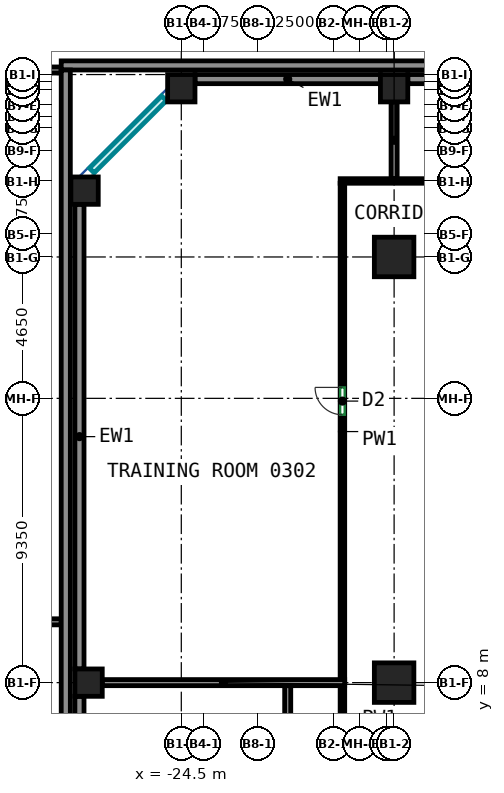
"""IFC4 building model, lengths in metres.
Left out: names, types, materials, properties, quantities, classifications, styles, units other than length and angle.
Written with IfcOpenShell. Run it as: python <this file> out.ifc"""

import sys

from ifc_helpers import new_model, si_unit, direction, frame, frame_2d, origin, origin_2d, place, context, subcontext, project, spatial, rectangle, extrude, source, transform, mapped, element, fill, save


model = new_model("IFC4")
c1 = context("Model", 3, precision=1e-05, world=origin(), true_north=direction((0.0, 1.0)))
c2 = subcontext(c1, "Body", "Model", "MODEL_VIEW")
j1 = project(units=[si_unit("LENGTHUNIT", "METRE"), si_unit("PLANEANGLEUNIT", "RADIAN")], contexts=[c1])
p1 = place(None, origin())
s1 = spatial("IfcSite", under=j1, at=p1, CompositionType="ELEMENT")
p2 = place(p1, origin())
s2 = spatial("IfcBuilding", under=s1, at=p2, CompositionType="ELEMENT")
p3 = place(p2, frame((0.0, 0.0, 18.0)))
s3 = spatial("IfcBuildingStorey", under=s2, at=p3, CompositionType="ELEMENT", Elevation=18.0)
m1 = source(origin(), c2, "Body", "SweptSolid", [
    extrude(rectangle(XDim=0.9, YDim=0.9, at=origin_2d()), origin(), (0.0, 0.0, 1.0), 4.1),
])
for number, where, z_axis, x_axis in (
    (1, (-27.682, 24.182, 0.0), (0.0, 0.0, 1.0), (1.0, 0.0, 0.0)),
    (2, (-27.55, 8.0, 0.0), (0.0, 0.0, 1.0), (1.0, 0.0, 0.0)),
    (3, (-24.5, 27.55, 0.0), (0.0, 0.0, 1.0), (1.0, 0.0, 0.0)),
):
    element("IfcColumn", number, at=place(p3, frame(where, z_axis=z_axis, x_axis=x_axis)), inside=s3, PredefinedType="COLUMN", context=c2, shape_type="MappedRepresentation", body=[
        mapped(m1, transform((0.0, 0.0, 0.0))),
    ])
m2 = source(origin(), c2, "Body", "SweptSolid", [
    extrude(rectangle(XDim=1.3, YDim=1.3, at=origin_2d()), origin(), (0.0, 0.0, 1.0), 4.1),
])
for number, where, z_axis, x_axis in (
    (4, (-17.5, 8.0, 0.0), (0.0, 0.0, 1.0), (1.0, 0.0, 0.0)),
    (5, (-17.5, 22.0, 0.0), (0.0, 0.0, 1.0), (1.0, 0.0, 0.0)),
):
    element("IfcColumn", number, at=place(p3, frame(where, z_axis=z_axis, x_axis=x_axis)), inside=s3, PredefinedType="COLUMN", context=c2, shape_type="MappedRepresentation", body=[
        mapped(m2, transform((0.0, 0.0, 0.0))),
    ])
p4 = place(p3, frame((-17.5, 27.55, 0.0), z_axis=(0.0, 0.0, 1.0), x_axis=(1.0, 0.0, 0.0)))
e6 = element("IfcColumn", 6, at=p4, inside=s3, PredefinedType="COLUMN", context=c2, shape_type="MappedRepresentation", body=[
    mapped(m1, transform((0.0, 0.0, 0.0))),
])
m3 = source(origin(), c2, "Body", "SweptSolid", [
    extrude(rectangle(XDim=6.1, YDim=0.3, at=frame_2d((3.05, 0.0))), origin(), (0.0, 0.0, 1.0), 4.1),
])
for number, where, z_axis, x_axis in (
    (7, (-10.95, 27.85, 0.0), (0.0, 0.0, 1.0), (-1.0, 0.0, 0.0)),
    (8, (-17.95, 27.85, 0.0), (0.0, 0.0, 1.0), (-1.0, 0.0, 0.0)),
):
    element("IfcWall", number, at=place(p3, frame(where, z_axis=z_axis, x_axis=x_axis)), inside=s3, PredefinedType="SOLIDWALL", context=c2, shape_type="MappedRepresentation", body=[
        mapped(m3, transform((0.0, 0.0, 0.0))),
    ])
m4 = source(origin(), c2, "Body", "SweptSolid", [
    extrude(rectangle(XDim=15.282, YDim=0.3, at=frame_2d((7.641, 0.0))), origin(), (0.0, 0.0, 1.0), 4.1),
])
p5 = place(p3, frame((-27.85, 23.732, 0.0), z_axis=(0.0, 0.0, 1.0), x_axis=(0.0, -1.0, 0.0)))
e9 = element("IfcWall", 9, at=p5, inside=s3, PredefinedType="SOLIDWALL", context=c2, shape_type="MappedRepresentation", body=[
    mapped(m4, transform((0.0, 0.0, 0.0))),
])
m5 = source(origin(), c2, "Body", "SweptSolid", [
    extrude(rectangle(XDim=8.1, YDim=0.3, at=frame_2d((4.05, 0.0))), origin(), (0.0, 0.0, 1.0), 4.1),
])
p6 = place(p3, frame((-27.85, 7.55, 0.0), z_axis=(0.0, 0.0, 1.0), x_axis=(0.0, -1.0, 0.0)))
e10 = element("IfcWall", 10, at=p6, inside=s3, PredefinedType="SOLIDWALL", context=c2, shape_type="MappedRepresentation", body=[
    mapped(m5, transform((0.0, 0.0, 0.0))),
])
m6 = source(origin(), c2, "Body", "SweptSolid", [
    extrude(rectangle(XDim=56.3, YDim=0.3, at=frame_2d((28.15, 0.0))), origin(), (0.0, 0.0, 1.0), 4.1),
])
p7 = place(p3, frame((27.85, 28.3, 0.0), z_axis=(0.0, 0.0, 1.0), x_axis=(-1.0, 0.0, 0.0)))
e11 = element("IfcWall", 11, at=p7, inside=s3, PredefinedType="SOLIDWALL", context=c2, shape_type="MappedRepresentation", body=[
    mapped(m6, transform((0.0, 0.0, 0.0))),
])
m7 = source(origin(), c2, "Body", "SweptSolid", [
    extrude(rectangle(XDim=56.3, YDim=0.3, at=frame_2d((28.15, 0.0))), origin(), (0.0, 0.0, 1.0), 4.1),
])
p8 = place(p3, frame((-28.3, 28.15, 0.0), z_axis=(0.0, 0.0, 1.0), x_axis=(0.0, -1.0, 0.0)))
e12 = element("IfcWall", 12, at=p8, inside=s3, PredefinedType="SOLIDWALL", context=c2, shape_type="MappedRepresentation", body=[
    mapped(m7, transform((0.0, 0.0, 0.0))),
])
p9 = place(p3, frame((-19.2, 5.675, 0.0), z_axis=(0.0, 0.0, 1.0), x_axis=(0.0, 1.0, 0.0)))
e13 = element("IfcWall", 13, at=p9, inside=s3, PredefinedType="PARTITIONING", context=c2, shape_type="SweptSolid", body=[
    extrude(rectangle(XDim=2.235, YDim=0.15, at=frame_2d((1.117, 0.0))), origin(), (0.0, 0.0, 1.0), 4.1),
])
p10 = place(p3, frame((-19.2, 8.09, 0.0), z_axis=(0.0, 0.0, 1.0), x_axis=(0.0, 1.0, 0.0)))
e14 = element("IfcWall", 14, at=p10, inside=s3, PredefinedType="PARTITIONING", context=c2, shape_type="SweptSolid", body=[
    extrude(rectangle(XDim=16.335, YDim=0.15, at=frame_2d((8.167, 0.0))), origin(), (0.0, 0.0, 1.0), 4.1),
])
p11 = place(p10, frame((8.72, 0.0, 0.0)))
e15 = element("IfcOpeningElement", 15, at=p11, cuts=e14, PredefinedType="OPENING", context=c2, shape_type="SweptSolid", body=[
    extrude(rectangle(XDim=0.9, YDim=2.1, at=frame_2d((0.45, 1.05))), frame((0.0, 0.085, 0.0), z_axis=(0.0, -1.0, 0.0), x_axis=(1.0, 0.0, 0.0)), (0.0, 0.0, 1.0), 0.17),
])
p12 = place(p3, frame((-19.275, 24.5, 0.0), z_axis=(0.0, 0.0, 1.0), x_axis=(1.0, 0.0, 0.0)))
e16 = element("IfcWall", 16, at=p12, inside=s3, PredefinedType="PARTITIONING", context=c2, shape_type="SweptSolid", body=[
    extrude(rectangle(XDim=40.35, YDim=0.15, at=frame_2d((20.175, 0.0))), origin(), (0.0, 0.0, 1.0), 3.45),
])
p13 = place(p12, frame((9.682, 0.0, 0.0)))
e17 = element("IfcOpeningElement", 17, at=p13, cuts=e16, PredefinedType="OPENING", context=c2, shape_type="SweptSolid", body=[
    extrude(rectangle(XDim=0.9, YDim=2.1, at=frame_2d((0.45, 1.05))), frame((0.0, 0.085, 0.0), z_axis=(0.0, -1.0, 0.0), x_axis=(1.0, 0.0, 0.0)), (0.0, 0.0, 1.0), 0.17),
])
p14 = place(p12, frame((13.569, 0.0, 0.0)))
e18 = element("IfcOpeningElement", 18, at=p14, cuts=e16, PredefinedType="OPENING", context=c2, shape_type="SweptSolid", body=[
    extrude(rectangle(XDim=0.9, YDim=2.1, at=frame_2d((0.45, 1.05))), frame((0.0, 0.085, 0.0), z_axis=(0.0, -1.0, 0.0), x_axis=(1.0, 0.0, 0.0)), (0.0, 0.0, 1.0), 0.17),
])
p15 = place(p12, frame((21.67, 0.0, 0.0)))
e19 = element("IfcOpeningElement", 19, at=p15, cuts=e16, PredefinedType="OPENING", context=c2, shape_type="SweptSolid", body=[
    extrude(rectangle(XDim=0.9, YDim=2.1, at=frame_2d((0.45, 1.05))), frame((0.0, 0.085, 0.0), z_axis=(0.0, -1.0, 0.0), x_axis=(1.0, 0.0, 0.0)), (0.0, 0.0, 1.0), 0.17),
])
p16 = place(p12, frame((35.011, 0.0, 0.0)))
e20 = element("IfcOpeningElement", 20, at=p16, cuts=e16, PredefinedType="OPENING", context=c2, shape_type="SweptSolid", body=[
    extrude(rectangle(XDim=0.9, YDim=2.1, at=frame_2d((0.45, 1.05))), frame((0.0, 0.085, 0.0), z_axis=(0.0, -1.0, 0.0), x_axis=(1.0, 0.0, 0.0)), (0.0, 0.0, 1.0), 0.17),
])
p17 = place(p3, frame((-21.0, 7.9, 0.0), z_axis=(0.0, 0.0, 1.0), x_axis=(0.0, -1.0, 0.0)))
e21 = element("IfcWall", 21, at=p17, inside=s3, PredefinedType="PARTITIONING", context=c2, shape_type="SweptSolid", body=[
    extrude(rectangle(XDim=13.3, YDim=0.2, at=frame_2d((6.65, 0.0))), origin(), (0.0, 0.0, 1.0), 4.1),
])
p18 = place(p3, frame((-27.1, 8.0, 0.0), z_axis=(0.0, 0.0, 1.0), x_axis=(1.0, 0.0, 0.0)))
e22 = element("IfcWall", 22, at=p18, inside=s3, PredefinedType="PARTITIONING", context=c2, shape_type="SweptSolid", body=[
    extrude(rectangle(XDim=7.974, YDim=0.2, at=frame_2d((3.987, 0.0))), origin(), (0.0, 0.0, 1.0), 3.45),
])
p19 = place(p3, frame((-17.5, 24.576, 0.0), z_axis=(0.0, 0.0, 1.0), x_axis=(0.0, 1.0, 0.0)))
e23 = element("IfcWall", 23, at=p19, inside=s3, PredefinedType="PARTITIONING", context=c2, shape_type="SweptSolid", body=[
    extrude(rectangle(XDim=2.524, YDim=0.2, at=frame_2d((1.262, 0.0))), origin(), (0.0, 0.0, 1.0), 3.45),
])
m8 = source(origin(), c2, "Body", "SweptSolid", [
    extrude(rectangle(XDim=10.1, YDim=0.2, at=frame_2d((5.05, 0.0))), origin(), (0.0, 0.0, 1.0), 3.3),
])
for number, where, z_axis, x_axis in (
    (24, (-38.55, 10.0, 0.0), (0.0, 0.0, 1.0), (1.0, 0.0, 0.0)),
    (25, (-38.55, 28.15, 0.0), (0.0, 0.0, 1.0), (1.0, 0.0, 0.0)),
):
    element("IfcWall", number, at=place(p3, frame(where, z_axis=z_axis, x_axis=x_axis)), inside=s3, PredefinedType="PARTITIONING", context=c2, shape_type="MappedRepresentation", body=[
        mapped(m8, transform((0.0, 0.0, 0.0))),
    ])
p20 = place(p11, origin())
e26 = element("IfcDoor", 26, at=p20, inside=s3, OperationType="SINGLE_SWING_RIGHT", PredefinedType="DOOR", context=c2, shape_type="SweptSolid", body=[
    extrude(rectangle(XDim=0.9, YDim=2.1, at=frame_2d((0.45, 1.05))), frame((0.0, 0.025, 0.0), z_axis=(0.0, -1.0, 0.0), x_axis=(1.0, 0.0, 0.0)), (0.0, 0.0, 1.0), 0.05),
])
fill(e15, e26)
save(model, sys.argv[1])
